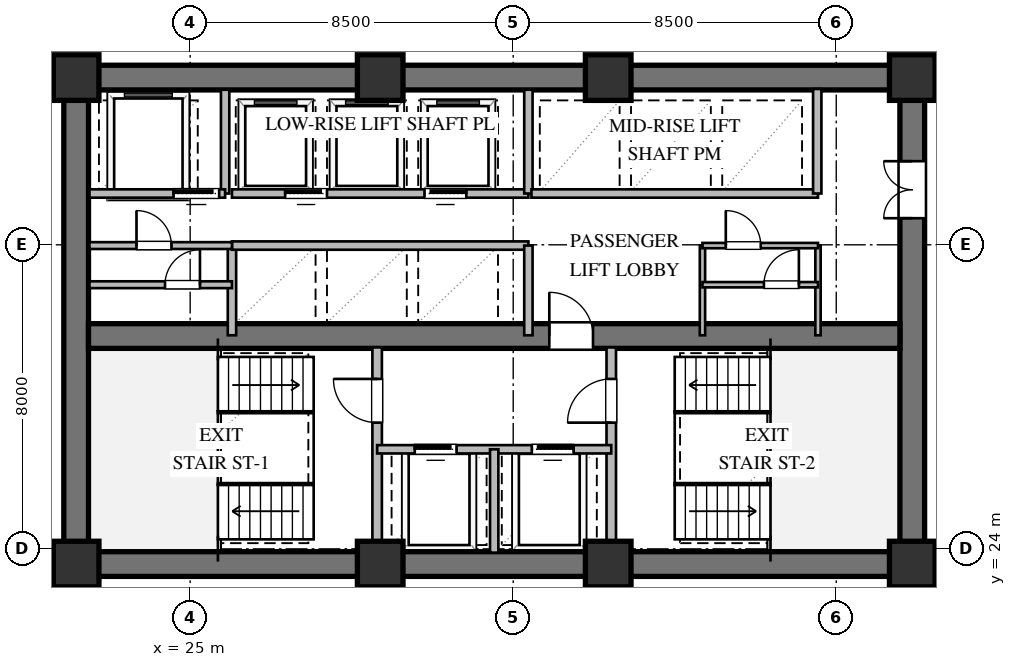
"""IFC4 building model, lengths in metres.
Left out: names, types, materials, properties, quantities, classifications, styles, units other than length and angle.
Written with IfcOpenShell. Run it as: python <this file> out.ifc"""

import sys

from ifc_helpers import new_model, si_unit, direction, frame, frame_2d, origin, origin_2d, place, context, subcontext, project, spatial, rectangle, extrude, element, fill, save


model = new_model("IFC4")
c1 = context("Model", 3, precision=1e-05, world=origin(), true_north=direction((0.0, 1.0)))
c2 = subcontext(c1, "Body", "Model", "MODEL_VIEW")
j1 = project(units=[si_unit("LENGTHUNIT", "METRE"), si_unit("PLANEANGLEUNIT", "RADIAN")], contexts=[c1])
p1 = place(None, origin())
s1 = spatial("IfcSite", under=j1, at=p1, CompositionType="ELEMENT")
p2 = place(p1, origin())
s2 = spatial("IfcBuilding", under=s1, at=p2, CompositionType="ELEMENT")
p3 = place(p2, frame((0.0, 0.0, 45.6)))
s3 = spatial("IfcBuildingStorey", under=s2, at=p3, CompositionType="ELEMENT", Elevation=45.6)
for number, where, z_axis, x_axis in (
    (1, (21.675, 23.6, 0.0), (0.0, 0.0, 1.0), (1.0, 0.0, 0.0)),
    (2, (21.675, 36.4, 0.0), (0.0, 0.0, 1.0), (1.0, 0.0, 0.0)),
):
    element("IfcWall", number, at=place(p3, frame(where, z_axis=z_axis, x_axis=x_axis)), inside=s3, PredefinedType="SHEAR", context=c2, shape_type="SweptSolid", body=[
        extrude(rectangle(XDim=22.65, YDim=0.65, at=frame_2d((11.325, 0.0))), origin(), (0.0, 0.0, 1.0), 3.36),
    ])
p4 = place(p3, frame((22.0, 23.925, 0.0), z_axis=(0.0, 0.0, 1.0), x_axis=(0.0, 1.0, 0.0)))
e3 = element("IfcWall", 3, at=p4, inside=s3, PredefinedType="SHEAR", context=c2, shape_type="SweptSolid", body=[
    extrude(rectangle(XDim=12.15, YDim=0.65, at=frame_2d((6.075, 0.0))), origin(), (0.0, 0.0, 1.0), 3.36),
])
p5 = place(p3, frame((44.0, 23.925, 0.0), z_axis=(0.0, 0.0, 1.0), x_axis=(0.0, 1.0, 0.0)))
e4 = element("IfcWall", 4, at=p5, inside=s3, PredefinedType="SHEAR", context=c2, shape_type="SweptSolid", body=[
    extrude(rectangle(XDim=12.15, YDim=0.65, at=frame_2d((6.075, 0.0))), origin(), (0.0, 0.0, 1.0), 3.36),
])
p6 = place(p5, frame((8.775, 0.0, 0.0)))
e5 = element("IfcOpeningElement", 5, at=p6, cuts=e4, PredefinedType="OPENING", context=c2, shape_type="SweptSolid", body=[
    extrude(rectangle(XDim=1.5, YDim=2.15, at=frame_2d((0.75, 1.075))), frame((0.0, 0.335, 0.0), z_axis=(0.0, -1.0, 0.0), x_axis=(1.0, 0.0, 0.0)), (0.0, 0.0, 1.0), 0.67),
])
p7 = place(p3, frame((22.325, 29.6, 0.0), z_axis=(0.0, 0.0, 1.0), x_axis=(1.0, 0.0, 0.0)))
e6 = element("IfcWall", 6, at=p7, inside=s3, PredefinedType="SHEAR", context=c2, shape_type="SweptSolid", body=[
    extrude(rectangle(XDim=21.35, YDim=0.65, at=frame_2d((10.675, 0.0))), origin(), (0.0, 0.0, 1.0), 3.36),
])
p8 = place(p7, frame((12.125, 0.0, 0.0)))
e7 = element("IfcOpeningElement", 7, at=p8, cuts=e6, PredefinedType="OPENING", context=c2, shape_type="SweptSolid", body=[
    extrude(rectangle(XDim=1.15, YDim=2.1, at=frame_2d((0.575, 1.05))), frame((0.0, 0.335, 0.0), z_axis=(0.0, -1.0, 0.0), x_axis=(1.0, 0.0, 0.0)), (0.0, 0.0, 1.0), 0.67),
])
for number, where, z_axis, x_axis in (
    (8, (22.0, 23.6, 0.0), (0.0, 0.0, 1.0), (1.0, 0.0, 0.0)),
    (9, (30.0, 23.6, 0.0), (0.0, 0.0, 1.0), (1.0, 0.0, 0.0)),
    (10, (36.0, 23.6, 0.0), (0.0, 0.0, 1.0), (1.0, 0.0, 0.0)),
    (11, (44.0, 23.6, 0.0), (0.0, 0.0, 1.0), (1.0, 0.0, 0.0)),
    (12, (44.0, 36.4, 0.0), (0.0, 0.0, 1.0), (1.0, 0.0, 0.0)),
    (13, (36.0, 36.4, 0.0), (0.0, 0.0, 1.0), (1.0, 0.0, 0.0)),
    (14, (30.0, 36.4, 0.0), (0.0, 0.0, 1.0), (1.0, 0.0, 0.0)),
    (15, (22.0, 36.4, 0.0), (0.0, 0.0, 1.0), (1.0, 0.0, 0.0)),
):
    element("IfcColumn", number, at=place(p3, frame(where, z_axis=z_axis, x_axis=x_axis)), inside=s3, PredefinedType="COLUMN", context=c2, shape_type="SweptSolid", body=[
        extrude(rectangle(XDim=1.2, YDim=1.2, at=origin_2d()), origin(), (0.0, 0.0, 1.0), 3.6),
    ])
p9 = place(p3, frame((29.92, 23.9, 0.0), z_axis=(0.0, 0.0, 1.0), x_axis=(0.0, 1.0, 0.0)))
e16 = element("IfcWall", 16, at=p9, inside=s3, PredefinedType="SOLIDWALL", context=c2, shape_type="SweptSolid", body=[
    extrude(rectangle(XDim=5.4, YDim=0.25, at=frame_2d((2.7, 0.0))), origin(), (0.0, 0.0, 1.0), 3.36),
])
p10 = place(p9, frame((3.421, 0.0, 0.0)))
e17 = element("IfcOpeningElement", 17, at=p10, cuts=e16, PredefinedType="OPENING", context=c2, shape_type="SweptSolid", body=[
    extrude(rectangle(XDim=1.15, YDim=2.1, at=frame_2d((0.575, 1.05))), frame((0.0, 0.135, 0.0), z_axis=(0.0, -1.0, 0.0), x_axis=(1.0, 0.0, 0.0)), (0.0, 0.0, 1.0), 0.27),
])
p11 = place(p3, frame((36.08, 23.9, 0.0), z_axis=(0.0, 0.0, 1.0), x_axis=(0.0, 1.0, 0.0)))
e18 = element("IfcWall", 18, at=p11, inside=s3, PredefinedType="SOLIDWALL", context=c2, shape_type="SweptSolid", body=[
    extrude(rectangle(XDim=5.4, YDim=0.25, at=frame_2d((2.7, 0.0))), origin(), (0.0, 0.0, 1.0), 3.36),
])
p12 = place(p11, frame((3.421, 0.0, 0.0)))
e19 = element("IfcOpeningElement", 19, at=p12, cuts=e18, PredefinedType="OPENING", context=c2, shape_type="SweptSolid", body=[
    extrude(rectangle(XDim=1.15, YDim=2.1, at=frame_2d((0.575, 1.05))), frame((0.0, 0.135, 0.0), z_axis=(0.0, -1.0, 0.0), x_axis=(1.0, 0.0, 0.0)), (0.0, 0.0, 1.0), 0.27),
])
p13 = place(p3, frame((29.92, 26.62, 0.0), z_axis=(0.0, 0.0, 1.0), x_axis=(1.0, 0.0, 0.0)))
e20 = element("IfcWall", 20, at=p13, inside=s3, PredefinedType="SOLIDWALL", context=c2, shape_type="SweptSolid", body=[
    extrude(rectangle(XDim=6.16, YDim=0.22, at=frame_2d((3.08, 0.0))), origin(), (0.0, 0.0, 1.0), 3.36),
])
p14 = place(p13, frame((0.99, 0.0, 0.0)))
e21 = element("IfcOpeningElement", 21, at=p14, cuts=e20, PredefinedType="OPENING", context=c2, shape_type="SweptSolid", body=[
    extrude(rectangle(XDim=1.1, YDim=2.1, at=frame_2d((0.55, 1.05))), frame((0.0, 0.12, 0.0), z_axis=(0.0, -1.0, 0.0), x_axis=(1.0, 0.0, 0.0)), (0.0, 0.0, 1.0), 0.24),
])
p15 = place(p13, frame((4.07, 0.0, 0.0)))
e22 = element("IfcOpeningElement", 22, at=p15, cuts=e20, PredefinedType="OPENING", context=c2, shape_type="SweptSolid", body=[
    extrude(rectangle(XDim=1.1, YDim=2.1, at=frame_2d((0.55, 1.05))), frame((0.0, 0.12, 0.0), z_axis=(0.0, -1.0, 0.0), x_axis=(1.0, 0.0, 0.0)), (0.0, 0.0, 1.0), 0.24),
])
p16 = place(p3, frame((33.0, 23.9, 0.0), z_axis=(0.0, 0.0, 1.0), x_axis=(0.0, 1.0, 0.0)))
e23 = element("IfcWall", 23, at=p16, inside=s3, PredefinedType="SOLIDWALL", context=c2, shape_type="SweptSolid", body=[
    extrude(rectangle(XDim=2.72, YDim=0.22, at=frame_2d((1.36, 0.0))), origin(), (0.0, 0.0, 1.0), 3.36),
])
p17 = place(p3, frame((25.92, 33.35, 0.0), z_axis=(0.0, 0.0, 1.0), x_axis=(0.0, 1.0, 0.0)))
e24 = element("IfcWall", 24, at=p17, inside=s3, PredefinedType="SOLIDWALL", context=c2, shape_type="SweptSolid", body=[
    extrude(rectangle(XDim=2.73, YDim=0.22, at=frame_2d((1.365, 0.0))), origin(), (0.0, 0.0, 1.0), 3.36),
])
p18 = place(p3, frame((22.35, 33.35, 0.0), z_axis=(0.0, 0.0, 1.0), x_axis=(1.0, 0.0, 0.0)))
e25 = element("IfcWall", 25, at=p18, inside=s3, PredefinedType="SOLIDWALL", context=c2, shape_type="SweptSolid", body=[
    extrude(rectangle(XDim=3.57, YDim=0.22, at=frame_2d((1.785, 0.0))), origin(), (0.0, 0.0, 1.0), 3.36),
])
p19 = place(p18, frame((2.213, 0.0, 0.0)))
e26 = element("IfcOpeningElement", 26, at=p19, cuts=e25, PredefinedType="OPENING", context=c2, shape_type="SweptSolid", body=[
    extrude(rectangle(XDim=1.2, YDim=2.1, at=frame_2d((0.6, 1.05))), frame((0.0, 0.12, 0.0), z_axis=(0.0, -1.0, 0.0), x_axis=(1.0, 0.0, 0.0)), (0.0, 0.0, 1.0), 0.24),
])
p20 = place(p3, frame((26.1, 29.62, 0.0), z_axis=(0.0, 0.0, 1.0), x_axis=(0.0, 1.0, 0.0)))
e27 = element("IfcWall", 27, at=p20, inside=s3, PredefinedType="SOLIDWALL", context=c2, shape_type="SweptSolid", body=[
    extrude(rectangle(XDim=2.36, YDim=0.22, at=frame_2d((1.18, 0.0))), origin(), (0.0, 0.0, 1.0), 3.36),
])
p21 = place(p3, frame((26.1, 31.98, 0.0), z_axis=(0.0, 0.0, 1.0), x_axis=(1.0, 0.0, 0.0)))
e28 = element("IfcWall", 28, at=p21, inside=s3, PredefinedType="SOLIDWALL", context=c2, shape_type="SweptSolid", body=[
    extrude(rectangle(XDim=7.8, YDim=0.22, at=frame_2d((3.9, 0.0))), origin(), (0.0, 0.0, 1.0), 3.36),
])
p22 = place(p3, frame((33.9, 29.62, 0.0), z_axis=(0.0, 0.0, 1.0), x_axis=(0.0, 1.0, 0.0)))
e29 = element("IfcWall", 29, at=p22, inside=s3, PredefinedType="SOLIDWALL", context=c2, shape_type="SweptSolid", body=[
    extrude(rectangle(XDim=2.36, YDim=0.22, at=frame_2d((1.18, 0.0))), origin(), (0.0, 0.0, 1.0), 3.36),
])
p23 = place(p3, frame((26.1, 33.35, 0.0), z_axis=(0.0, 0.0, 1.0), x_axis=(1.0, 0.0, 0.0)))
e30 = element("IfcWall", 30, at=p23, inside=s3, PredefinedType="SOLIDWALL", context=c2, shape_type="SweptSolid", body=[
    extrude(rectangle(XDim=7.8, YDim=0.22, at=frame_2d((3.9, 0.0))), origin(), (0.0, 0.0, 1.0), 3.36),
])
p24 = place(p23, frame((1.4, 0.0, 0.0)))
e31 = element("IfcOpeningElement", 31, at=p24, cuts=e30, PredefinedType="OPENING", context=c2, shape_type="SweptSolid", body=[
    extrude(rectangle(XDim=1.1, YDim=2.1, at=frame_2d((0.55, 1.05))), frame((0.0, 0.12, 0.0), z_axis=(0.0, -1.0, 0.0), x_axis=(1.0, 0.0, 0.0)), (0.0, 0.0, 1.0), 0.24),
])
p25 = place(p23, frame((5.066, 0.0, 0.0)))
e32 = element("IfcOpeningElement", 32, at=p25, cuts=e30, PredefinedType="OPENING", context=c2, shape_type="SweptSolid", body=[
    extrude(rectangle(XDim=1.1, YDim=2.1, at=frame_2d((0.55, 1.05))), frame((0.0, 0.12, 0.0), z_axis=(0.0, -1.0, 0.0), x_axis=(1.0, 0.0, 0.0)), (0.0, 0.0, 1.0), 0.24),
])
p26 = place(p3, frame((33.9, 33.35, 0.0), z_axis=(0.0, 0.0, 1.0), x_axis=(0.0, 1.0, 0.0)))
e33 = element("IfcWall", 33, at=p26, inside=s3, PredefinedType="SOLIDWALL", context=c2, shape_type="SweptSolid", body=[
    extrude(rectangle(XDim=2.73, YDim=0.22, at=frame_2d((1.365, 0.0))), origin(), (0.0, 0.0, 1.0), 3.36),
])
p27 = place(p3, frame((33.98, 33.35, 0.0), z_axis=(0.0, 0.0, 1.0), x_axis=(1.0, 0.0, 0.0)))
e34 = element("IfcWall", 34, at=p27, inside=s3, PredefinedType="SOLIDWALL", context=c2, shape_type="SweptSolid", body=[
    extrude(rectangle(XDim=7.54, YDim=0.22, at=frame_2d((3.77, 0.0))), origin(), (0.0, 0.0, 1.0), 3.36),
])
p28 = place(p3, frame((41.5, 33.35, 0.0), z_axis=(0.0, 0.0, 1.0), x_axis=(0.0, 1.0, 0.0)))
e35 = element("IfcWall", 35, at=p28, inside=s3, PredefinedType="SOLIDWALL", context=c2, shape_type="SweptSolid", body=[
    extrude(rectangle(XDim=2.75, YDim=0.22, at=frame_2d((1.375, 0.0))), origin(), (0.0, 0.0, 1.0), 3.36),
])
p29 = place(p3, frame((22.35, 30.95, 0.0), z_axis=(0.0, 0.0, 1.0), x_axis=(1.0, 0.0, 0.0)))
e36 = element("IfcWall", 36, at=p29, inside=s3, PredefinedType="PARTITIONING", context=c2, shape_type="SweptSolid", body=[
    extrude(rectangle(XDim=3.75, YDim=0.18, at=frame_2d((1.875, 0.0))), origin(), (0.0, 0.0, 1.0), 3.36),
])
p30 = place(p29, frame((1.988, 0.0, 0.0)))
e37 = element("IfcOpeningElement", 37, at=p30, cuts=e36, PredefinedType="OPENING", context=c2, shape_type="SweptSolid", body=[
    extrude(rectangle(XDim=0.92, YDim=2.1, at=frame_2d((0.46, 1.05))), frame((0.0, 0.1, 0.0), z_axis=(0.0, -1.0, 0.0), x_axis=(1.0, 0.0, 0.0)), (0.0, 0.0, 1.0), 0.2),
])
p31 = place(p3, frame((22.35, 31.98, 0.0), z_axis=(0.0, 0.0, 1.0), x_axis=(1.0, 0.0, 0.0)))
e38 = element("IfcWall", 38, at=p31, inside=s3, PredefinedType="PARTITIONING", context=c2, shape_type="SweptSolid", body=[
    extrude(rectangle(XDim=3.75, YDim=0.18, at=frame_2d((1.875, 0.0))), origin(), (0.0, 0.0, 1.0), 3.36),
])
p32 = place(p31, frame((1.238, 0.0, 0.0)))
e39 = element("IfcOpeningElement", 39, at=p32, cuts=e38, PredefinedType="OPENING", context=c2, shape_type="SweptSolid", body=[
    extrude(rectangle(XDim=0.92, YDim=2.1, at=frame_2d((0.46, 1.05))), frame((0.0, 0.1, 0.0), z_axis=(0.0, -1.0, 0.0), x_axis=(1.0, 0.0, 0.0)), (0.0, 0.0, 1.0), 0.2),
])
for number, where, z_axis, x_axis in (
    (40, (38.48, 29.62, 0.0), (0.0, 0.0, 1.0), (0.0, 1.0, 0.0)),
    (41, (41.52, 29.62, 0.0), (0.0, 0.0, 1.0), (0.0, 1.0, 0.0)),
):
    element("IfcWall", number, at=place(p3, frame(where, z_axis=z_axis, x_axis=x_axis)), inside=s3, PredefinedType="PARTITIONING", context=c2, shape_type="SweptSolid", body=[
        extrude(rectangle(XDim=2.36, YDim=0.14, at=frame_2d((1.18, 0.0))), origin(), (0.0, 0.0, 1.0), 3.36),
    ])
p33 = place(p3, frame((38.48, 30.95, 0.0), z_axis=(0.0, 0.0, 1.0), x_axis=(1.0, 0.0, 0.0)))
e42 = element("IfcWall", 42, at=p33, inside=s3, PredefinedType="PARTITIONING", context=c2, shape_type="SweptSolid", body=[
    extrude(rectangle(XDim=3.04, YDim=0.14, at=frame_2d((1.52, 0.0))), origin(), (0.0, 0.0, 1.0), 3.36),
])
p34 = place(p33, frame((1.617, 0.0, 0.0)))
e43 = element("IfcOpeningElement", 43, at=p34, cuts=e42, PredefinedType="OPENING", context=c2, shape_type="SweptSolid", body=[
    extrude(rectangle(XDim=0.92, YDim=2.1, at=frame_2d((0.46, 1.05))), frame((0.0, 0.08, 0.0), z_axis=(0.0, -1.0, 0.0), x_axis=(1.0, 0.0, 0.0)), (0.0, 0.0, 1.0), 0.16),
])
p35 = place(p3, frame((38.48, 31.98, 0.0), z_axis=(0.0, 0.0, 1.0), x_axis=(1.0, 0.0, 0.0)))
e44 = element("IfcWall", 44, at=p35, inside=s3, PredefinedType="PARTITIONING", context=c2, shape_type="SweptSolid", body=[
    extrude(rectangle(XDim=3.04, YDim=0.14, at=frame_2d((1.52, 0.0))), origin(), (0.0, 0.0, 1.0), 3.36),
])
p36 = place(p35, frame((0.614, 0.0, 0.0)))
e45 = element("IfcOpeningElement", 45, at=p36, cuts=e44, PredefinedType="OPENING", context=c2, shape_type="SweptSolid", body=[
    extrude(rectangle(XDim=0.92, YDim=2.1, at=frame_2d((0.46, 1.05))), frame((0.0, 0.08, 0.0), z_axis=(0.0, -1.0, 0.0), x_axis=(1.0, 0.0, 0.0)), (0.0, 0.0, 1.0), 0.16),
])
p37 = place(p10, origin())
e46 = element("IfcDoor", 46, at=p37, inside=s3, OperationType="SINGLE_SWING_RIGHT", PredefinedType="DOOR", context=c2, shape_type="SweptSolid", body=[
    extrude(rectangle(XDim=1.15, YDim=2.1, at=frame_2d((0.575, 1.05))), frame((0.0, 0.025, 0.0), z_axis=(0.0, -1.0, 0.0), x_axis=(1.0, 0.0, 0.0)), (0.0, 0.0, 1.0), 0.05),
])
fill(e17, e46)
p38 = place(p12, origin())
e47 = element("IfcDoor", 47, at=p38, inside=s3, OperationType="SINGLE_SWING_LEFT", PredefinedType="DOOR", context=c2, shape_type="SweptSolid", body=[
    extrude(rectangle(XDim=1.15, YDim=2.1, at=frame_2d((0.575, 1.05))), frame((0.0, 0.025, 0.0), z_axis=(0.0, -1.0, 0.0), x_axis=(1.0, 0.0, 0.0)), (0.0, 0.0, 1.0), 0.05),
])
fill(e19, e47)
p39 = place(p14, origin())
e48 = element("IfcDoor", 48, at=p39, inside=s3, OperationType="SLIDING_TO_LEFT", PredefinedType="DOOR", context=c2, shape_type="SweptSolid", body=[
    extrude(rectangle(XDim=1.1, YDim=2.1, at=frame_2d((0.55, 1.05))), frame((0.0, 0.025, 0.0), z_axis=(0.0, -1.0, 0.0), x_axis=(1.0, 0.0, 0.0)), (0.0, 0.0, 1.0), 0.05),
])
fill(e21, e48)
p40 = place(p15, origin())
e49 = element("IfcDoor", 49, at=p40, inside=s3, OperationType="SLIDING_TO_RIGHT", PredefinedType="DOOR", context=c2, shape_type="SweptSolid", body=[
    extrude(rectangle(XDim=1.1, YDim=2.1, at=frame_2d((0.55, 1.05))), frame((0.0, 0.025, 0.0), z_axis=(0.0, -1.0, 0.0), x_axis=(1.0, 0.0, 0.0)), (0.0, 0.0, 1.0), 0.05),
])
fill(e22, e49)
p41 = place(p8, origin())
e50 = element("IfcDoor", 50, at=p41, inside=s3, OperationType="SINGLE_SWING_LEFT", PredefinedType="DOOR", context=c2, shape_type="SweptSolid", body=[
    extrude(rectangle(XDim=1.15, YDim=2.1, at=frame_2d((0.575, 1.05))), frame((0.0, 0.025, 0.0), z_axis=(0.0, -1.0, 0.0), x_axis=(1.0, 0.0, 0.0)), (0.0, 0.0, 1.0), 0.05),
])
fill(e7, e50)
p42 = place(p6, origin())
e51 = element("IfcDoor", 51, at=p42, inside=s3, OperationType="DOUBLE_DOOR_SINGLE_SWING", PredefinedType="DOOR", context=c2, shape_type="SweptSolid", body=[
    extrude(rectangle(XDim=1.5, YDim=2.15, at=frame_2d((0.75, 1.075))), frame((0.0, 0.025, 0.0), z_axis=(0.0, -1.0, 0.0), x_axis=(1.0, 0.0, 0.0)), (0.0, 0.0, 1.0), 0.05),
])
fill(e5, e51)
p43 = place(p19, origin())
e52 = element("IfcDoor", 52, at=p43, inside=s3, OperationType="SLIDING_TO_LEFT", PredefinedType="DOOR", context=c2, shape_type="SweptSolid", body=[
    extrude(rectangle(XDim=1.2, YDim=2.1, at=frame_2d((0.6, 1.05))), frame((0.0, 0.025, 0.0), z_axis=(0.0, -1.0, 0.0), x_axis=(1.0, 0.0, 0.0)), (0.0, 0.0, 1.0), 0.05),
])
fill(e26, e52)
p44 = place(p24, origin())
e53 = element("IfcDoor", 53, at=p44, inside=s3, OperationType="SLIDING_TO_LEFT", PredefinedType="DOOR", context=c2, shape_type="SweptSolid", body=[
    extrude(rectangle(XDim=1.1, YDim=2.1, at=frame_2d((0.55, 1.05))), frame((0.0, 0.025, 0.0), z_axis=(0.0, -1.0, 0.0), x_axis=(1.0, 0.0, 0.0)), (0.0, 0.0, 1.0), 0.05),
])
fill(e31, e53)
p45 = place(p25, origin())
e54 = element("IfcDoor", 54, at=p45, inside=s3, OperationType="SLIDING_TO_RIGHT", PredefinedType="DOOR", context=c2, shape_type="SweptSolid", body=[
    extrude(rectangle(XDim=1.1, YDim=2.1, at=frame_2d((0.55, 1.05))), frame((0.0, 0.025, 0.0), z_axis=(0.0, -1.0, 0.0), x_axis=(1.0, 0.0, 0.0)), (0.0, 0.0, 1.0), 0.05),
])
fill(e32, e54)
p46 = place(p32, origin())
e55 = element("IfcDoor", 55, at=p46, inside=s3, OperationType="SINGLE_SWING_LEFT", PredefinedType="DOOR", context=c2, shape_type="SweptSolid", body=[
    extrude(rectangle(XDim=0.92, YDim=2.1, at=frame_2d((0.46, 1.05))), frame((0.0, 0.025, 0.0), z_axis=(0.0, -1.0, 0.0), x_axis=(1.0, 0.0, 0.0)), (0.0, 0.0, 1.0), 0.05),
])
fill(e39, e55)
p47 = place(p30, origin())
e56 = element("IfcDoor", 56, at=p47, inside=s3, OperationType="SINGLE_SWING_RIGHT", PredefinedType="DOOR", context=c2, shape_type="SweptSolid", body=[
    extrude(rectangle(XDim=0.92, YDim=2.1, at=frame_2d((0.46, 1.05))), frame((0.0, 0.025, 0.0), z_axis=(0.0, -1.0, 0.0), x_axis=(1.0, 0.0, 0.0)), (0.0, 0.0, 1.0), 0.05),
])
fill(e37, e56)
p48 = place(p36, origin())
e57 = element("IfcDoor", 57, at=p48, inside=s3, OperationType="SINGLE_SWING_LEFT", PredefinedType="DOOR", context=c2, shape_type="SweptSolid", body=[
    extrude(rectangle(XDim=0.92, YDim=2.1, at=frame_2d((0.46, 1.05))), frame((0.0, 0.025, 0.0), z_axis=(0.0, -1.0, 0.0), x_axis=(1.0, 0.0, 0.0)), (0.0, 0.0, 1.0), 0.05),
])
fill(e45, e57)
p49 = place(p34, origin())
e58 = element("IfcDoor", 58, at=p49, inside=s3, OperationType="SINGLE_SWING_RIGHT", PredefinedType="DOOR", context=c2, shape_type="SweptSolid", body=[
    extrude(rectangle(XDim=0.92, YDim=2.1, at=frame_2d((0.46, 1.05))), frame((0.0, 0.025, 0.0), z_axis=(0.0, -1.0, 0.0), x_axis=(1.0, 0.0, 0.0)), (0.0, 0.0, 1.0), 0.05),
])
fill(e43, e58)
save(model, sys.argv[1])
